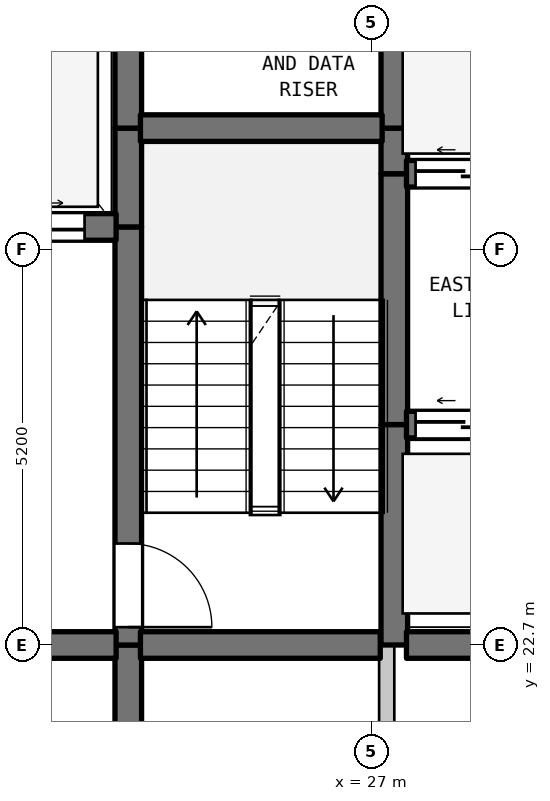
"""IFC4 building model, lengths in metres.
Left out: names, types, materials, properties, quantities, classifications, styles, units other than length and angle.
Written with IfcOpenShell. Run it as: python <this file> out.ifc"""

import sys

from ifc_helpers import new_model, si_unit, direction, frame, frame_2d, origin, place, context, subcontext, project, spatial, rectangle, extrude, element, fill, save


model = new_model("IFC4")
c1 = context("Model", 3, precision=1e-05, world=origin(), true_north=direction((0.0, 1.0)))
c2 = subcontext(c1, "Body", "Model", "MODEL_VIEW")
j1 = project(units=[si_unit("LENGTHUNIT", "METRE"), si_unit("PLANEANGLEUNIT", "RADIAN")], contexts=[c1])
p1 = place(None, origin())
s1 = spatial("IfcSite", under=j1, at=p1, CompositionType="ELEMENT")
p2 = place(p1, origin())
s2 = spatial("IfcBuilding", under=s1, at=p2, CompositionType="ELEMENT")
p3 = place(p2, frame((0.0, 0.0, 148.3)))
s3 = spatial("IfcBuildingStorey", under=s2, at=p3, CompositionType="ELEMENT", Elevation=148.3)
p4 = place(p3, frame((23.8, 19.5, 0.0), z_axis=(0.0, 0.0, 1.0), x_axis=(0.0, 1.0, 0.0)))
e1 = element("IfcWall", 1, at=p4, inside=s3, PredefinedType="SHEAR", context=c2, shape_type="SweptSolid", body=[
    extrude(rectangle(XDim=3.2, YDim=0.35, at=frame_2d((1.6, 0.0))), origin(), (0.0, 0.0, 1.0), 3.385),
])
p5 = place(p3, frame((23.8, 22.7, 0.0), z_axis=(0.0, 0.0, 1.0), x_axis=(0.0, 1.0, 0.0)))
e2 = element("IfcWall", 2, at=p5, inside=s3, PredefinedType="SHEAR", context=c2, shape_type="SweptSolid", body=[
    extrude(rectangle(XDim=5.5, YDim=0.35, at=frame_2d((2.75, 0.0))), origin(), (0.0, 0.0, 1.0), 3.385),
])
p6 = place(p5, frame((0.235, 0.0, 0.0)))
e3 = element("IfcOpeningElement", 3, at=p6, cuts=e2, PredefinedType="OPENING", context=c2, shape_type="SweptSolid", body=[
    extrude(rectangle(XDim=1.1, YDim=2.15, at=frame_2d((0.55, 1.075))), frame((0.0, 0.185, 0.0), z_axis=(0.0, -1.0, 0.0), x_axis=(1.0, 0.0, 0.0)), (0.0, 0.0, 1.0), 0.37),
])
for number, where, z_axis, x_axis in (
    (4, (23.8, 28.2, 0.0), (0.0, 0.0, 1.0), (0.0, 1.0, 0.0)),
    (5, (23.8, 29.5, 0.0), (0.0, 0.0, 1.0), (0.0, 1.0, 0.0)),
):
    element("IfcWall", number, at=place(p3, frame(where, z_axis=z_axis, x_axis=x_axis)), inside=s3, PredefinedType="SHEAR", context=c2, shape_type="SweptSolid", body=[
        extrude(rectangle(XDim=1.3, YDim=0.35, at=frame_2d((0.65, 0.0))), origin(), (0.0, 0.0, 1.0), 3.385),
    ])
p7 = place(p3, frame((27.2, 21.1, 0.0), z_axis=(0.0, 0.0, 1.0), x_axis=(0.0, 1.0, 0.0)))
e6 = element("IfcWall", 6, at=p7, inside=s3, PredefinedType="STANDARD", context=c2, shape_type="SweptSolid", body=[
    extrude(rectangle(XDim=1.6, YDim=0.2, at=frame_2d((0.8, 0.0))), origin(), (0.0, 0.0, 1.0), 3.385),
])
p8 = place(p3, frame((27.3, 22.7, 0.0), z_axis=(0.0, 0.0, 1.0), x_axis=(0.0, 1.0, 0.0)))
e7 = element("IfcWall", 7, at=p8, inside=s3, PredefinedType="SHEAR", context=c2, shape_type="SweptSolid", body=[
    extrude(rectangle(XDim=2.9, YDim=0.35, at=frame_2d((1.45, 0.0))), origin(), (0.0, 0.0, 1.0), 3.385),
])
p9 = place(p3, frame((27.3, 25.6, 0.0), z_axis=(0.0, 0.0, 1.0), x_axis=(0.0, 1.0, 0.0)))
e8 = element("IfcWall", 8, at=p9, inside=s3, PredefinedType="SHEAR", context=c2, shape_type="SweptSolid", body=[
    extrude(rectangle(XDim=3.3, YDim=0.35, at=frame_2d((1.65, 0.0))), origin(), (0.0, 0.0, 1.0), 3.385),
])
p10 = place(p3, frame((27.3, 28.9, 0.0), z_axis=(0.0, 0.0, 1.0), x_axis=(0.0, 1.0, 0.0)))
e9 = element("IfcWall", 9, at=p10, inside=s3, PredefinedType="SHEAR", context=c2, shape_type="SweptSolid", body=[
    extrude(rectangle(XDim=0.6, YDim=0.35, at=frame_2d((0.3, 0.0))), origin(), (0.0, 0.0, 1.0), 3.385),
])
p11 = place(p3, frame((27.3, 29.5, 0.0), z_axis=(0.0, 0.0, 1.0), x_axis=(0.0, 1.0, 0.0)))
e10 = element("IfcWall", 10, at=p11, inside=s3, PredefinedType="SHEAR", context=c2, shape_type="SweptSolid", body=[
    extrude(rectangle(XDim=2.0, YDim=0.35, at=frame_2d((1.0, 0.0))), origin(), (0.0, 0.0, 1.0), 3.385),
])
p12 = place(p3, frame((19.16, 22.7, 0.0), z_axis=(0.0, 0.0, 1.0), x_axis=(1.0, 0.0, 0.0)))
e11 = element("IfcWall", 11, at=p12, inside=s3, PredefinedType="SHEAR", context=c2, shape_type="SweptSolid", body=[
    extrude(rectangle(XDim=4.48, YDim=0.35, at=frame_2d((2.24, 0.0))), origin(), (0.0, 0.0, 1.0), 3.385),
])
p13 = place(p12, frame((1.64, 0.0, 0.0)))
e12 = element("IfcOpeningElement", 12, at=p13, cuts=e11, PredefinedType="OPENING", context=c2, shape_type="SweptSolid", body=[
    extrude(rectangle(XDim=1.2, YDim=2.2, at=frame_2d((0.6, 1.1))), frame((0.0, 0.185, 0.0), z_axis=(0.0, -1.0, 0.0), x_axis=(1.0, 0.0, 0.0)), (0.0, 0.0, 1.0), 0.37),
])
p14 = place(p3, frame((23.96, 22.7, 0.0), z_axis=(0.0, 0.0, 1.0), x_axis=(1.0, 0.0, 0.0)))
e13 = element("IfcWall", 13, at=p14, inside=s3, PredefinedType="SHEAR", context=c2, shape_type="SweptSolid", body=[
    extrude(rectangle(XDim=3.155, YDim=0.35, at=frame_2d((1.578, 0.0))), origin(), (0.0, 0.0, 1.0), 3.385),
])
p15 = place(p3, frame((27.46, 22.7, 0.0), z_axis=(0.0, 0.0, 1.0), x_axis=(1.0, 0.0, 0.0)))
e14 = element("IfcWall", 14, at=p15, inside=s3, PredefinedType="SHEAR", context=c2, shape_type="SweptSolid", body=[
    extrude(rectangle(XDim=3.18, YDim=0.35, at=frame_2d((1.59, 0.0))), origin(), (0.0, 0.0, 1.0), 3.385),
])
p16 = place(p3, frame((27.46, 25.6, 0.0), z_axis=(0.0, 0.0, 1.0), x_axis=(1.0, 0.0, 0.0)))
e15 = element("IfcWall", 15, at=p16, inside=s3, PredefinedType="SHEAR", context=c2, shape_type="SweptSolid", body=[
    extrude(rectangle(XDim=3.18, YDim=0.35, at=frame_2d((1.59, 0.0))), origin(), (0.0, 0.0, 1.0), 3.385),
])
p17 = place(p16, frame((0.12, 0.0, 0.0)))
e16 = element("IfcOpeningElement", 16, at=p17, cuts=e15, PredefinedType="OPENING", context=c2, shape_type="SweptSolid", body=[
    extrude(rectangle(XDim=1.25, YDim=2.2, at=frame_2d((0.625, 1.1))), frame((0.0, 0.185, 0.0), z_axis=(0.0, -1.0, 0.0), x_axis=(1.0, 0.0, 0.0)), (0.0, 0.0, 1.0), 0.37),
])
p18 = place(p16, frame((1.81, 0.0, 0.0)))
e17 = element("IfcOpeningElement", 17, at=p18, cuts=e15, PredefinedType="OPENING", context=c2, shape_type="SweptSolid", body=[
    extrude(rectangle(XDim=1.25, YDim=2.2, at=frame_2d((0.625, 1.1))), frame((0.0, 0.185, 0.0), z_axis=(0.0, -1.0, 0.0), x_axis=(1.0, 0.0, 0.0)), (0.0, 0.0, 1.0), 0.37),
])
p19 = place(p3, frame((19.16, 28.2, 0.0), z_axis=(0.0, 0.0, 1.0), x_axis=(1.0, 0.0, 0.0)))
e18 = element("IfcWall", 18, at=p19, inside=s3, PredefinedType="SHEAR", context=c2, shape_type="SweptSolid", body=[
    extrude(rectangle(XDim=4.48, YDim=0.35, at=frame_2d((2.24, 0.0))), origin(), (0.0, 0.0, 1.0), 3.385),
])
p20 = place(p19, frame((0.415, 0.0, 0.0)))
e19 = element("IfcOpeningElement", 19, at=p20, cuts=e18, PredefinedType="OPENING", context=c2, shape_type="SweptSolid", body=[
    extrude(rectangle(XDim=1.25, YDim=2.2, at=frame_2d((0.625, 1.1))), frame((0.0, 0.185, 0.0), z_axis=(0.0, -1.0, 0.0), x_axis=(1.0, 0.0, 0.0)), (0.0, 0.0, 1.0), 0.37),
])
p21 = place(p19, frame((2.815, 0.0, 0.0)))
e20 = element("IfcOpeningElement", 20, at=p21, cuts=e18, PredefinedType="OPENING", context=c2, shape_type="SweptSolid", body=[
    extrude(rectangle(XDim=1.25, YDim=2.2, at=frame_2d((0.625, 1.1))), frame((0.0, 0.185, 0.0), z_axis=(0.0, -1.0, 0.0), x_axis=(1.0, 0.0, 0.0)), (0.0, 0.0, 1.0), 0.37),
])
p22 = place(p3, frame((27.46, 28.9, 0.0), z_axis=(0.0, 0.0, 1.0), x_axis=(1.0, 0.0, 0.0)))
e21 = element("IfcWall", 21, at=p22, inside=s3, PredefinedType="SHEAR", context=c2, shape_type="SweptSolid", body=[
    extrude(rectangle(XDim=3.18, YDim=0.35, at=frame_2d((1.59, 0.0))), origin(), (0.0, 0.0, 1.0), 3.385),
])
p23 = place(p22, frame((0.12, 0.0, 0.0)))
e22 = element("IfcOpeningElement", 22, at=p23, cuts=e21, PredefinedType="OPENING", context=c2, shape_type="SweptSolid", body=[
    extrude(rectangle(XDim=1.25, YDim=2.2, at=frame_2d((0.625, 1.1))), frame((0.0, 0.185, 0.0), z_axis=(0.0, -1.0, 0.0), x_axis=(1.0, 0.0, 0.0)), (0.0, 0.0, 1.0), 0.37),
])
p24 = place(p22, frame((1.81, 0.0, 0.0)))
e23 = element("IfcOpeningElement", 23, at=p24, cuts=e21, PredefinedType="OPENING", context=c2, shape_type="SweptSolid", body=[
    extrude(rectangle(XDim=1.25, YDim=2.2, at=frame_2d((0.625, 1.1))), frame((0.0, 0.185, 0.0), z_axis=(0.0, -1.0, 0.0), x_axis=(1.0, 0.0, 0.0)), (0.0, 0.0, 1.0), 0.37),
])
p25 = place(p3, frame((23.96, 29.5, 0.0), z_axis=(0.0, 0.0, 1.0), x_axis=(1.0, 0.0, 0.0)))
e24 = element("IfcWall", 24, at=p25, inside=s3, PredefinedType="SHEAR", context=c2, shape_type="SweptSolid", body=[
    extrude(rectangle(XDim=3.18, YDim=0.35, at=frame_2d((1.59, 0.0))), origin(), (0.0, 0.0, 1.0), 3.385),
])
p26 = place(p6, frame((1.1, 0.0, 0.0), z_axis=(0.0, 0.0, 1.0), x_axis=(-1.0, 0.0, 0.0)))
e25 = element("IfcDoor", 25, at=p26, inside=s3, OperationType="SINGLE_SWING_LEFT", PredefinedType="DOOR", context=c2, shape_type="SweptSolid", body=[
    extrude(rectangle(XDim=1.1, YDim=2.15, at=frame_2d((0.55, 1.075))), frame((0.0, 0.025, 0.0), z_axis=(0.0, -1.0, 0.0), x_axis=(1.0, 0.0, 0.0)), (0.0, 0.0, 1.0), 0.05),
])
fill(e3, e25)
p27 = place(p17, origin())
e26 = element("IfcDoor", 26, at=p27, inside=s3, OperationType="DOUBLE_DOOR_SLIDING", PredefinedType="DOOR", context=c2, shape_type="SweptSolid", body=[
    extrude(rectangle(XDim=1.25, YDim=2.2, at=frame_2d((0.625, 1.1))), frame((0.0, 0.025, 0.0), z_axis=(0.0, -1.0, 0.0), x_axis=(1.0, 0.0, 0.0)), (0.0, 0.0, 1.0), 0.05),
])
fill(e16, e26)
p28 = place(p21, origin())
e27 = element("IfcDoor", 27, at=p28, inside=s3, OperationType="DOUBLE_DOOR_SLIDING", PredefinedType="DOOR", context=c2, shape_type="SweptSolid", body=[
    extrude(rectangle(XDim=1.25, YDim=2.2, at=frame_2d((0.625, 1.1))), frame((0.0, 0.025, 0.0), z_axis=(0.0, -1.0, 0.0), x_axis=(1.0, 0.0, 0.0)), (0.0, 0.0, 1.0), 0.05),
])
fill(e20, e27)
p29 = place(p23, origin())
e28 = element("IfcDoor", 28, at=p29, inside=s3, OperationType="DOUBLE_DOOR_SLIDING", PredefinedType="DOOR", context=c2, shape_type="SweptSolid", body=[
    extrude(rectangle(XDim=1.25, YDim=2.2, at=frame_2d((0.625, 1.1))), frame((0.0, 0.025, 0.0), z_axis=(0.0, -1.0, 0.0), x_axis=(1.0, 0.0, 0.0)), (0.0, 0.0, 1.0), 0.05),
])
fill(e22, e28)
save(model, sys.argv[1])
